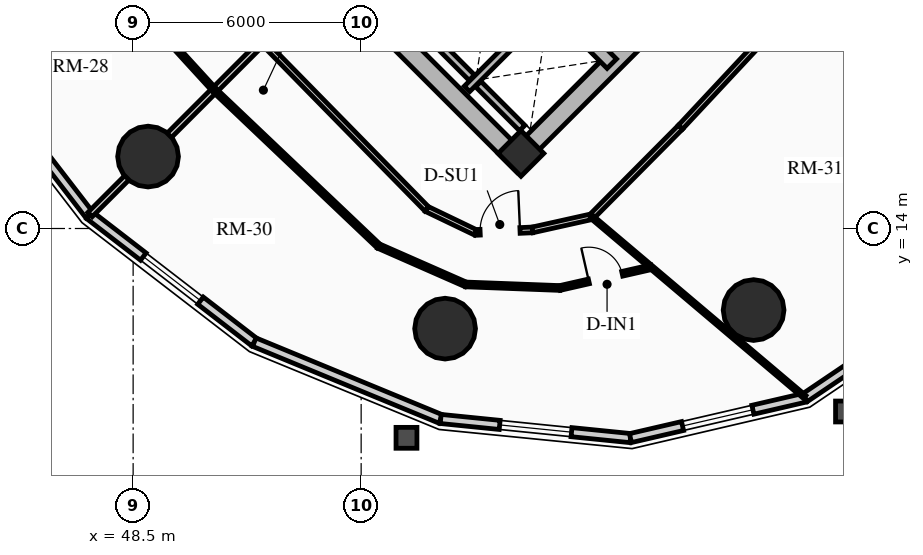
"""IFC4 building model, lengths in metres.
Left out: names, types, materials, properties, quantities, classifications, styles, units other than length and angle.
Written with IfcOpenShell. Run it as: python <this file> out.ifc"""

import sys

from ifc_helpers import new_model, si_unit, direction, frame, frame_2d, origin, origin_2d, place, context, subcontext, project, spatial, rectangle, circle, extrude, source, transform, mapped, element, fill, save


model = new_model("IFC4")
c1 = context("Model", 3, precision=1e-05, world=origin(), true_north=direction((0.0, 1.0)))
c2 = subcontext(c1, "Body", "Model", "MODEL_VIEW")
j1 = project(units=[si_unit("LENGTHUNIT", "METRE"), si_unit("PLANEANGLEUNIT", "RADIAN")], contexts=[c1])
p1 = place(None, origin())
s1 = spatial("IfcSite", under=j1, at=p1, CompositionType="ELEMENT")
p2 = place(p1, origin())
s2 = spatial("IfcBuilding", under=s1, at=p2, CompositionType="ELEMENT")
p3 = place(p2, frame((0.0, 0.0, 27.82)))
s3 = spatial("IfcBuildingStorey", under=s2, at=p3, CompositionType="ELEMENT", Elevation=27.82)
p4 = place(p3, frame((58.773, 15.661, 0.0), z_axis=(0.0, 0.0, 1.0), x_axis=(-0.707106781187, 0.707106781187, 0.0)))
e1 = element("IfcWall", 1, at=p4, inside=s3, PredefinedType="SHEAR", context=c2, shape_type="SweptSolid", body=[
    extrude(rectangle(XDim=14.3, YDim=0.5, at=frame_2d((7.15, 0.0))), origin(), (0.0, 0.0, 1.0), 2.91),
])
p5 = place(p3, frame((58.596, 15.838, 0.0), z_axis=(0.0, 0.0, 1.0), x_axis=(0.707106781187, 0.707106781187, 0.0)))
e2 = element("IfcWall", 2, at=p5, inside=s3, PredefinedType="SHEAR", context=c2, shape_type="SweptSolid", body=[
    extrude(rectangle(XDim=10.7, YDim=0.5, at=frame_2d((5.35, 0.0))), origin(), (0.0, 0.0, 1.0), 2.91),
])
m1 = source(origin(), c2, "Body", "SweptSolid", [
    extrude(rectangle(XDim=1.5, YDim=2.02, at=frame_2d((0.75, 1.01))), frame((0.0, 0.26, 0.0), z_axis=(0.0, -1.0, 0.0), x_axis=(1.0, 0.0, 0.0)), (0.0, 0.0, 1.0), 0.52),
])
p6 = place(p5, frame((5.45, 0.0, 0.0)))
e3 = element("IfcOpeningElement", 3, at=p6, cuts=e2, PredefinedType="OPENING", context=c2, shape_type="MappedRepresentation", body=[
    mapped(m1, transform((0.0, 0.0, 0.0), x_axis=(1.0, 0.0, 0.0), y_axis=(0.0, 1.0, 0.0), z_axis=(0.0, 0.0, 1.0), scale=1.0)),
])
p7 = place(p3, frame((61.096, 18.338, 0.0), z_axis=(0.0, 0.0, 1.0), x_axis=(-0.707106781187, 0.707106781187, 0.0)))
e4 = element("IfcWall", 4, at=p7, inside=s3, PredefinedType="SHEAR", context=c2, shape_type="SweptSolid", body=[
    extrude(rectangle(XDim=13.8, YDim=0.35, at=frame_2d((6.9, 0.0))), origin(), (0.0, 0.0, 1.0), 2.91),
])
m2 = source(origin(), c2, "Body", "SweptSolid", [
    extrude(rectangle(XDim=1.1, YDim=2.015, at=frame_2d((0.55, 1.007))), frame((0.0, 0.185, 0.0), z_axis=(0.0, -1.0, 0.0), x_axis=(1.0, 0.0, 0.0)), (0.0, 0.0, 1.0), 0.37),
])
p8 = place(p7, frame((4.9, 0.0, 0.0)))
e5 = element("IfcOpeningElement", 5, at=p8, cuts=e4, PredefinedType="OPENING", context=c2, shape_type="MappedRepresentation", body=[
    mapped(m2, transform((0.0, 0.0, 0.0), x_axis=(1.0, 0.0, 0.0), y_axis=(0.0, 1.0, 0.0), z_axis=(0.0, 0.0, 1.0), scale=1.0)),
])
m3 = source(origin(), c2, "Body", "SweptSolid", [
    extrude(rectangle(XDim=1.15, YDim=2.02, at=frame_2d((0.575, 1.01))), frame((0.0, 0.185, 0.0), z_axis=(0.0, -1.0, 0.0), x_axis=(1.0, 0.0, 0.0)), (0.0, 0.0, 1.0), 0.37),
])
p9 = place(p7, frame((7.32, 0.0, 0.0)))
e6 = element("IfcOpeningElement", 6, at=p9, cuts=e4, PredefinedType="OPENING", context=c2, shape_type="MappedRepresentation", body=[
    mapped(m3, transform((0.0, 0.0, 0.0), x_axis=(1.0, 0.0, 0.0), y_axis=(0.0, 1.0, 0.0), z_axis=(0.0, 0.0, 1.0), scale=1.0)),
])
p10 = place(p3, frame((58.706, 15.976, 0.0), z_axis=(0.0, 0.0, 1.0), x_axis=(0.707106781187, 0.707106781187, 0.0)))
e7 = element("IfcColumn", 7, at=p10, inside=s3, PredefinedType="COLUMN", context=c2, shape_type="SweptSolid", body=[
    extrude(rectangle(XDim=0.85, YDim=0.85, at=origin_2d()), origin(), (0.0, 0.0, 1.0), 2.91),
])
for number, where, z_axis, x_axis in (
    (8, (48.893, 15.893, 0.0), (0.0, 0.0, 1.0), (1.0, 0.0, 0.0)),
    (9, (56.709, 11.365, 0.0), (0.0, 0.0, 1.0), (1.0, 0.0, 0.0)),
    (10, (64.827, 11.854, 0.0), (0.0, 0.0, 1.0), (1.0, 0.0, 0.0)),
):
    element("IfcColumn", number, at=place(p3, frame(where, z_axis=z_axis, x_axis=x_axis)), inside=s3, PredefinedType="USERDEFINED", context=c2, shape_type="SweptSolid", body=[
        extrude(circle(Radius=0.8, at=origin_2d()), origin(), (0.0, 0.0, 1.0), 2.91),
    ])
p11 = place(p3, frame((47.352, 14.352, 0.0), z_axis=(0.0, 0.0, 1.0), x_axis=(-0.610557396243, 0.791972010801, 0.0)))
e11 = element("IfcWall", 11, at=p11, inside=s3, PredefinedType="SOLIDWALL", context=c2, shape_type="SweptSolid", body=[
    extrude(rectangle(XDim=5.475, YDim=0.24, at=frame_2d((2.737, 0.0))), origin(), (0.0, 0.0, 1.0), 2.073),
])
p12 = place(p3, frame((51.688, 11.01, 0.0), z_axis=(0.0, 0.0, 1.0), x_axis=(-0.791972010801, 0.610557396243, 0.0)))
e12 = element("IfcWall", 12, at=p12, inside=s3, PredefinedType="SOLIDWALL", context=c2, shape_type="SweptSolid", body=[
    extrude(rectangle(XDim=5.475, YDim=0.24, at=frame_2d((2.737, 0.0))), origin(), (0.0, 0.0, 1.0), 2.073),
])
m4 = source(origin(), c2, "Body", "SweptSolid", [
    extrude(rectangle(XDim=1.9, YDim=1.35, at=frame_2d((0.95, 0.675))), frame((0.0, 0.13, 0.0), z_axis=(0.0, -1.0, 0.0), x_axis=(1.0, 0.0, 0.0)), (0.0, 0.0, 1.0), 0.26),
])
p13 = place(p12, frame((1.787, 0.0, 0.65)))
e13 = element("IfcOpeningElement", 13, at=p13, cuts=e12, PredefinedType="OPENING", context=c2, shape_type="MappedRepresentation", body=[
    mapped(m4, transform((0.0, 0.0, 0.0), x_axis=(1.0, 0.0, 0.0), y_axis=(0.0, 1.0, 0.0), z_axis=(0.0, 0.0, 1.0), scale=1.0)),
])
p14 = place(p3, frame((56.593, 8.988, 0.0), z_axis=(0.0, 0.0, 1.0), x_axis=(-0.924528403616, 0.381113147118, 0.0)))
e14 = element("IfcWall", 14, at=p14, inside=s3, PredefinedType="SOLIDWALL", context=c2, shape_type="SweptSolid", body=[
    extrude(rectangle(XDim=5.305, YDim=0.24, at=frame_2d((2.653, 0.0))), origin(), (0.0, 0.0, 1.0), 2.635),
])
p15 = place(p3, frame((61.586, 8.484, 0.0), z_axis=(0.0, 0.0, 1.0), x_axis=(-0.994951574538, 0.100356187272, 0.0)))
e15 = element("IfcWall", 15, at=p15, inside=s3, PredefinedType="SOLIDWALL", context=c2, shape_type="SweptSolid", body=[
    extrude(rectangle(XDim=5.019, YDim=0.24, at=frame_2d((2.509, 0.0))), origin(), (0.0, 0.0, 1.0), 2.635),
])
p16 = place(p15, frame((1.559, 0.0, 0.65)))
e16 = element("IfcOpeningElement", 16, at=p16, cuts=e15, PredefinedType="OPENING", context=c2, shape_type="MappedRepresentation", body=[
    mapped(m4, transform((0.0, 0.0, 0.0), x_axis=(1.0, 0.0, 0.0), y_axis=(0.0, 1.0, 0.0), z_axis=(0.0, 0.0, 1.0), scale=1.0)),
])
p17 = place(p3, frame((66.18, 9.548, 0.0), z_axis=(0.0, 0.0, 1.0), x_axis=(-0.974197104074, -0.225698919833, 0.0)))
e17 = element("IfcWall", 17, at=p17, inside=s3, PredefinedType="SOLIDWALL", context=c2, shape_type="SweptSolid", body=[
    extrude(rectangle(XDim=4.715, YDim=0.24, at=frame_2d((2.357, 0.0))), origin(), (0.0, 0.0, 1.0), 2.635),
])
p18 = place(p17, frame((1.408, 0.0, 0.65)))
e18 = element("IfcOpeningElement", 18, at=p18, cuts=e17, PredefinedType="OPENING", context=c2, shape_type="MappedRepresentation", body=[
    mapped(m4, transform((0.0, 0.0, 0.0), x_axis=(1.0, 0.0, 0.0), y_axis=(0.0, 1.0, 0.0), z_axis=(0.0, 0.0, 1.0), scale=1.0)),
])
p19 = place(p3, frame((69.924, 12.076, 0.0), z_axis=(0.0, 0.0, 1.0), x_axis=(-0.828776615238, -0.559579594012, 0.0)))
e19 = element("IfcWall", 19, at=p19, inside=s3, PredefinedType="SOLIDWALL", context=c2, shape_type="SweptSolid", body=[
    extrude(rectangle(XDim=4.517, YDim=0.24, at=frame_2d((2.259, 0.0))), origin(), (0.0, 0.0, 1.0), 2.635),
])
p20 = place(p3, frame((57.284, 17.673, 0.0), z_axis=(0.0, 0.0, 1.0), x_axis=(0.707147878904, 0.70706568108, 0.0)))
e20 = element("IfcWall", 20, at=p20, inside=s3, PredefinedType="SHEAR", context=c2, shape_type="SweptSolid", body=[
    extrude(rectangle(XDim=2.97, YDim=0.2, at=frame_2d((1.485, 0.0))), origin(), (0.0, 0.0, 1.0), 2.91),
])
p21 = place(p3, frame((57.412, 17.97, 0.0), z_axis=(0.0, 0.0, 1.0), x_axis=(-0.707106781187, 0.707106781187, 0.0)))
e21 = element("IfcWall", 21, at=p21, inside=s3, PredefinedType="SHEAR", context=c2, shape_type="SweptSolid", body=[
    extrude(rectangle(XDim=1.735, YDim=0.2, at=frame_2d((0.867, 0.0))), origin(), (0.0, 0.0, 1.0), 2.91),
])
p22 = place(p3, frame((58.737, 16.644, 0.0), z_axis=(0.0, 0.0, 1.0), x_axis=(-0.707032117043, 0.707181437447, 0.0)))
e22 = element("IfcWall", 22, at=p22, inside=s3, PredefinedType="SHEAR", context=c2, shape_type="SweptSolid", body=[
    extrude(rectangle(XDim=1.635, YDim=0.2, at=frame_2d((0.817, 0.0))), origin(), (0.0, 0.0, 1.0), 2.91),
])
p23 = place(p3, frame((51.914, 18.914, 0.0), z_axis=(0.0, 0.0, 1.0), x_axis=(0.699999313799, -0.714143515465, 0.0)))
e23 = element("IfcWall", 23, at=p23, inside=s3, PredefinedType="PARTITIONING", context=c2, shape_type="SweptSolid", body=[
    extrude(rectangle(XDim=6.162, YDim=0.15, at=frame_2d((3.081, 0.0))), origin(), (0.0, 0.0, 1.0), 2.159),
])
p24 = place(p3, frame((56.227, 14.513, 0.0), z_axis=(0.0, 0.0, 1.0), x_axis=(0.901477579283, -0.432825801044, 0.0)))
e24 = element("IfcWall", 24, at=p24, inside=s3, PredefinedType="PARTITIONING", context=c2, shape_type="SweptSolid", body=[
    extrude(rectangle(XDim=1.424, YDim=0.15, at=frame_2d((0.712, 0.0))), origin(), (0.0, 0.0, 1.0), 2.205),
])
p25 = place(p3, frame((57.511, 13.897, 0.0), z_axis=(0.0, 0.0, 1.0), x_axis=(0.999024538494, 0.044158481476, 0.0)))
e25 = element("IfcWall", 25, at=p25, inside=s3, PredefinedType="PARTITIONING", context=c2, shape_type="SweptSolid", body=[
    extrude(rectangle(XDim=1.498, YDim=0.15, at=frame_2d((0.749, 0.0))), origin(), (0.0, 0.0, 1.0), 2.159),
])
m5 = source(origin(), c2, "Body", "SweptSolid", [
    extrude(rectangle(XDim=1.05, YDim=2.015, at=frame_2d((0.525, 1.007))), frame((0.0, 0.085, 0.0), z_axis=(0.0, -1.0, 0.0), x_axis=(1.0, 0.0, 0.0)), (0.0, 0.0, 1.0), 0.17),
])
p26 = place(p25, frame((0.12, 0.0, 0.0)))
e26 = element("IfcOpeningElement", 26, at=p26, cuts=e25, PredefinedType="OPENING", context=c2, shape_type="MappedRepresentation", body=[
    mapped(m5, transform((0.0, 0.0, 0.0), x_axis=(1.0, 0.0, 0.0), y_axis=(0.0, 1.0, 0.0), z_axis=(0.0, 0.0, 1.0), scale=1.0)),
])
p27 = place(p3, frame((59.008, 13.963, 0.0), z_axis=(0.0, 0.0, 1.0), x_axis=(0.976020856791, 0.21767702476, 0.0)))
e27 = element("IfcWall", 27, at=p27, inside=s3, PredefinedType="PARTITIONING", context=c2, shape_type="SweptSolid", body=[
    extrude(rectangle(XDim=1.593, YDim=0.15, at=frame_2d((0.796, 0.0))), origin(), (0.0, 0.0, 1.0), 2.205),
])
p28 = place(p3, frame((60.562, 14.31, 0.0), z_axis=(0.0, 0.0, 1.0), x_axis=(0.704566236161, 0.709638230975, 0.0)))
e28 = element("IfcWall", 28, at=p28, inside=s3, PredefinedType="PARTITIONING", context=c2, shape_type="SweptSolid", body=[
    extrude(rectangle(XDim=3.321, YDim=0.15, at=frame_2d((1.661, 0.0))), origin(), (0.0, 0.0, 1.0), 2.159),
])
p29 = place(p3, frame((62.903, 16.667, 0.0), z_axis=(0.0, 0.0, 1.0), x_axis=(0.682371947497, 0.731005147225, 0.0)))
e29 = element("IfcWall", 29, at=p29, inside=s3, PredefinedType="PARTITIONING", context=c2, shape_type="SweptSolid", body=[
    extrude(rectangle(XDim=6.642, YDim=0.15, at=frame_2d((3.321, 0.0))), origin(), (0.0, 0.0, 1.0), 2.159),
])
p30 = place(p3, frame((51.914, 18.914, 0.0), z_axis=(0.0, 0.0, 1.0), x_axis=(-0.707106781187, -0.707106781187, 0.0)))
e30 = element("IfcWall", 30, at=p30, inside=s3, PredefinedType="PARTITIONING", context=c2, shape_type="SweptSolid", body=[
    extrude(rectangle(XDim=6.431, YDim=0.16, at=frame_2d((3.215, 0.0))), origin(), (0.0, 0.0, 1.0), 2.073),
])
p31 = place(p3, frame((60.562, 14.31, 0.0), z_axis=(0.0, 0.0, 1.0), x_axis=(0.763547638675, -0.645751502881, 0.0)))
e31 = element("IfcWall", 31, at=p31, inside=s3, PredefinedType="MOVABLE", context=c2, shape_type="SweptSolid", body=[
    extrude(rectangle(XDim=7.345, YDim=0.1, at=frame_2d((3.673, 0.0))), origin(), (0.0, 0.0, 1.0), 2.073),
])
p32 = place(p3, frame((46.676, 21.978, 0.0), z_axis=(0.0, 0.0, 1.0), x_axis=(0.67473816271, -0.738057187339, 0.0)))
e32 = element("IfcWall", 32, at=p32, inside=s3, PredefinedType="PARTITIONING", context=c2, shape_type="SweptSolid", body=[
    extrude(rectangle(XDim=5.876, YDim=0.125, at=frame_2d((2.938, 0.0))), origin(), (0.0, 0.0, 1.0), 2.635),
])
p33 = place(p3, frame((50.641, 17.641, 0.0), z_axis=(0.0, 0.0, 1.0), x_axis=(0.724909383019, -0.688844239586, 0.0)))
e33 = element("IfcWall", 33, at=p33, inside=s3, PredefinedType="PARTITIONING", context=c2, shape_type="SweptSolid", body=[
    extrude(rectangle(XDim=5.957, YDim=0.125, at=frame_2d((2.979, 0.0))), origin(), (0.0, 0.0, 1.0), 2.159),
])
p34 = place(p3, frame((54.959, 13.537, 0.0), z_axis=(0.0, 0.0, 1.0), x_axis=(0.915414044123, -0.402513512596, 0.0)))
e34 = element("IfcWall", 34, at=p34, inside=s3, PredefinedType="PARTITIONING", context=c2, shape_type="SweptSolid", body=[
    extrude(rectangle(XDim=2.508, YDim=0.125, at=frame_2d((1.254, 0.0))), origin(), (0.0, 0.0, 1.0), 2.159),
])
p35 = place(p3, frame((57.255, 12.528, 0.0), z_axis=(0.0, 0.0, 1.0), x_axis=(0.999290303909, -0.037668136579, 0.0)))
e35 = element("IfcWall", 35, at=p35, inside=s3, PredefinedType="PARTITIONING", context=c2, shape_type="SweptSolid", body=[
    extrude(rectangle(XDim=2.476, YDim=0.125, at=frame_2d((1.238, 0.0))), origin(), (0.0, 0.0, 1.0), 2.159),
])
p36 = place(p3, frame((59.729, 12.434, 0.0), z_axis=(0.0, 0.0, 1.0), x_axis=(0.975062765266, 0.221929276555, 0.0)))
e36 = element("IfcWall", 36, at=p36, inside=s3, PredefinedType="PARTITIONING", context=c2, shape_type="SweptSolid", body=[
    extrude(rectangle(XDim=2.465, YDim=0.125, at=frame_2d((1.233, 0.0))), origin(), (0.0, 0.0, 1.0), 2.205),
])
m6 = source(origin(), c2, "Body", "SweptSolid", [
    extrude(rectangle(XDim=0.9, YDim=2.005, at=frame_2d((0.45, 1.002))), frame((0.0, 0.073, 0.0), z_axis=(0.0, -1.0, 0.0), x_axis=(1.0, 0.0, 0.0)), (0.0, 0.0, 1.0), 0.145),
])
p37 = place(p36, frame((0.783, 0.0, 0.0)))
e37 = element("IfcOpeningElement", 37, at=p37, cuts=e36, PredefinedType="OPENING", context=c2, shape_type="MappedRepresentation", body=[
    mapped(m6, transform((0.0, 0.0, 0.0), x_axis=(1.0, 0.0, 0.0), y_axis=(0.0, 1.0, 0.0), z_axis=(0.0, 0.0, 1.0), scale=1.0)),
])
m7 = source(origin(), c2, "Body", "SweptSolid", [
    extrude(rectangle(XDim=1.9, YDim=1.35, at=frame_2d((0.95, 0.675))), frame((0.0, 0.03, 0.0), z_axis=(0.0, -1.0, 0.0), x_axis=(1.0, 0.0, 0.0)), (0.0, 0.0, 1.0), 0.06),
])
p38 = place(p13, origin())
e38 = element("IfcWindow", 38, at=p38, inside=s3, PartitioningType="DOUBLE_PANEL_VERTICAL", PredefinedType="WINDOW", context=c2, shape_type="MappedRepresentation", body=[
    mapped(m7, transform((0.0, 0.0, 0.0), x_axis=(1.0, 0.0, 0.0), y_axis=(0.0, 1.0, 0.0), z_axis=(0.0, 0.0, 1.0), scale=1.0)),
])
fill(e13, e38)
p39 = place(p16, origin())
e39 = element("IfcWindow", 39, at=p39, inside=s3, PartitioningType="DOUBLE_PANEL_VERTICAL", PredefinedType="WINDOW", context=c2, shape_type="MappedRepresentation", body=[
    mapped(m7, transform((0.0, 0.0, 0.0), x_axis=(1.0, 0.0, 0.0), y_axis=(0.0, 1.0, 0.0), z_axis=(0.0, 0.0, 1.0), scale=1.0)),
])
fill(e16, e39)
p40 = place(p18, origin())
e40 = element("IfcWindow", 40, at=p40, inside=s3, PartitioningType="DOUBLE_PANEL_VERTICAL", PredefinedType="WINDOW", context=c2, shape_type="MappedRepresentation", body=[
    mapped(m7, transform((0.0, 0.0, 0.0), x_axis=(1.0, 0.0, 0.0), y_axis=(0.0, 1.0, 0.0), z_axis=(0.0, 0.0, 1.0), scale=1.0)),
])
fill(e18, e40)
m8 = source(origin(), c2, "Body", "SweptSolid", [
    extrude(rectangle(XDim=1.05, YDim=2.015, at=frame_2d((0.525, 1.007))), frame((0.0, 0.025, 0.0), z_axis=(0.0, -1.0, 0.0), x_axis=(1.0, 0.0, 0.0)), (0.0, 0.0, 1.0), 0.05),
])
p41 = place(p26, origin())
e41 = element("IfcDoor", 41, at=p41, inside=s3, OperationType="SINGLE_SWING_RIGHT", PredefinedType="DOOR", context=c2, shape_type="MappedRepresentation", body=[
    mapped(m8, transform((0.0, 0.0, 0.0), x_axis=(1.0, 0.0, 0.0), y_axis=(0.0, 1.0, 0.0), z_axis=(0.0, 0.0, 1.0), scale=1.0)),
])
fill(e26, e41)
m9 = source(origin(), c2, "Body", "SweptSolid", [
    extrude(rectangle(XDim=0.9, YDim=2.005, at=frame_2d((0.45, 1.002))), frame((0.0, 0.025, 0.0), z_axis=(0.0, -1.0, 0.0), x_axis=(1.0, 0.0, 0.0)), (0.0, 0.0, 1.0), 0.05),
])
p42 = place(p37, origin())
e42 = element("IfcDoor", 42, at=p42, inside=s3, OperationType="SINGLE_SWING_LEFT", PredefinedType="DOOR", context=c2, shape_type="MappedRepresentation", body=[
    mapped(m9, transform((0.0, 0.0, 0.0), x_axis=(1.0, 0.0, 0.0), y_axis=(0.0, 1.0, 0.0), z_axis=(0.0, 0.0, 1.0), scale=1.0)),
])
fill(e37, e42)
save(model, sys.argv[1])
